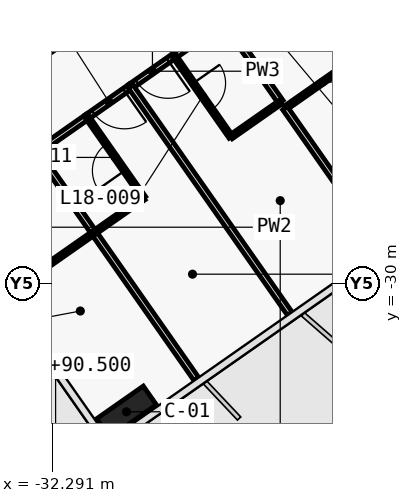
"""IFC4 building model, lengths in metres.
Left out: names, types, materials, properties, quantities, classifications, styles, units other than length and angle.
Written with IfcOpenShell. Run it as: python <this file> out.ifc"""

import sys

from ifc_helpers import new_model, si_unit, direction, frame, frame_2d, origin, origin_2d, place, context, subcontext, project, spatial, rectangle, extrude, element, fill, save


model = new_model("IFC4")
c1 = context("Model", 3, precision=1e-05, world=origin(), true_north=direction((0.0, 1.0)))
c2 = subcontext(c1, "Body", "Model", "MODEL_VIEW")
j1 = project(units=[si_unit("LENGTHUNIT", "METRE"), si_unit("PLANEANGLEUNIT", "RADIAN")], contexts=[c1])
p1 = place(None, origin())
s1 = spatial("IfcSite", under=j1, at=p1, CompositionType="ELEMENT")
p2 = place(p1, origin())
s2 = spatial("IfcBuilding", under=s1, at=p2, CompositionType="ELEMENT")
p3 = place(p2, frame((0.0, 0.0, 90.5)))
s3 = spatial("IfcBuildingStorey", under=s2, at=p3, CompositionType="ELEMENT", Elevation=90.5)
p4 = place(p3, frame((-30.336, -33.388, 0.0), z_axis=(0.0, 0.0, 1.0), x_axis=(-0.819152044289, -0.573576436351, 0.0)))
e1 = element("IfcColumn", 1, at=p4, inside=s3, PredefinedType="COLUMN", context=c2, shape_type="SweptSolid", body=[
    extrude(rectangle(XDim=1.5, YDim=0.6, at=origin_2d()), origin(), (0.0, 0.0, 1.0), 3.6),
])
p5 = place(p3, frame((-33.341, -24.566, 0.0), z_axis=(0.0, 0.0, 1.0), x_axis=(0.819179439794, 0.573537309527, 0.0)))
e2 = element("IfcWall", 2, at=p5, inside=s3, PredefinedType="PARTITIONING", context=c2, shape_type="SweptSolid", body=[
    extrude(rectangle(XDim=2.404, YDim=0.15, at=frame_2d((1.202, 0.0))), origin(), (0.0, 0.0, 1.0), 3.32),
])
p6 = place(p3, frame((-29.079, -24.023, 0.0), z_axis=(0.0, 0.0, 1.0), x_axis=(-0.81914197737, -0.573590813132, 0.0)))
e3 = element("IfcWall", 3, at=p6, inside=s3, PredefinedType="PARTITIONING", context=c2, shape_type="SweptSolid", body=[
    extrude(rectangle(XDim=1.403, YDim=0.15, at=frame_2d((0.701, 0.0))), origin(), (0.0, 0.0, 1.0), 3.32),
])
p7 = place(p6, frame((0.201, 0.0, 0.0)))
e4 = element("IfcOpeningElement", 4, at=p7, cuts=e3, PredefinedType="OPENING", context=c2, shape_type="SweptSolid", body=[
    extrude(rectangle(XDim=1.0, YDim=2.1, at=frame_2d((0.5, 1.05))), frame((0.0, 0.085, 0.0), z_axis=(0.0, -1.0, 0.0), x_axis=(1.0, 0.0, 0.0)), (0.0, 0.0, 1.0), 0.17),
])
p8 = place(p3, frame((-27.767, -23.105, 0.0), z_axis=(0.0, 0.0, 1.0), x_axis=(-0.819117502046, -0.573625764625, 0.0)))
e5 = element("IfcWall", 5, at=p8, inside=s3, PredefinedType="PARTITIONING", context=c2, shape_type="SweptSolid", body=[
    extrude(rectangle(XDim=1.604, YDim=0.15, at=frame_2d((0.802, 0.0))), origin(), (0.0, 0.0, 1.0), 2.6),
])
p9 = place(p3, frame((-30.225, -24.826, 0.0), z_axis=(0.0, 0.0, 1.0), x_axis=(-0.819060210533, -0.573707566205, 0.0)))
e6 = element("IfcWall", 6, at=p9, inside=s3, PredefinedType="PARTITIONING", context=c2, shape_type="SweptSolid", body=[
    extrude(rectangle(XDim=1.403, YDim=0.15, at=frame_2d((0.702, 0.0))), origin(), (0.0, 0.0, 1.0), 3.32),
])
p10 = place(p9, frame((0.202, 0.0, 0.0)))
e7 = element("IfcOpeningElement", 7, at=p10, cuts=e6, PredefinedType="OPENING", context=c2, shape_type="SweptSolid", body=[
    extrude(rectangle(XDim=1.0, YDim=2.1, at=frame_2d((0.5, 1.05))), frame((0.0, 0.085, 0.0), z_axis=(0.0, -1.0, 0.0), x_axis=(1.0, 0.0, 0.0)), (0.0, 0.0, 1.0), 0.17),
])
p11 = place(p3, frame((-31.371, -25.629, 0.0), z_axis=(0.0, 0.0, 1.0), x_axis=(-0.819189013667, -0.573523634986, 0.0)))
e8 = element("IfcWall", 8, at=p11, inside=s3, PredefinedType="PARTITIONING", context=c2, shape_type="SweptSolid", body=[
    extrude(rectangle(XDim=1.604, YDim=0.15, at=frame_2d((0.802, 0.0))), origin(), (0.0, 0.0, 1.0), 3.32),
])
p12 = place(p3, frame((-26.162, -25.401, 0.0), z_axis=(0.0, 0.0, 1.0), x_axis=(0.819155442668, 0.573571582932, 0.0)))
e9 = element("IfcWall", 9, at=p12, inside=s3, PredefinedType="PARTITIONING", context=c2, shape_type="SweptSolid", body=[
    extrude(rectangle(XDim=2.4, YDim=0.12, at=frame_2d((1.2, 0.0))), origin(), (0.0, 0.0, 1.0), 2.6),
])
p13 = place(p3, frame((-24.196, -24.023, 0.0), z_axis=(0.0, 0.0, 1.0), x_axis=(-0.573608623498, 0.819129505664, 0.0)))
e10 = element("IfcWall", 10, at=p13, inside=s3, PredefinedType="PARTITIONING", context=c2, shape_type="SweptSolid", body=[
    extrude(rectangle(XDim=2.8, YDim=0.12, at=frame_2d((1.4, 0.0))), origin(), (0.0, 0.0, 1.0), 3.32),
])
p14 = place(p13, frame((0.975, 0.0, 0.0)))
e11 = element("IfcOpeningElement", 11, at=p14, cuts=e10, PredefinedType="OPENING", context=c2, shape_type="SweptSolid", body=[
    extrude(rectangle(XDim=0.85, YDim=2.05, at=frame_2d((0.425, 1.025))), frame((0.0, 0.07, 0.0), z_axis=(0.0, -1.0, 0.0), x_axis=(1.0, 0.0, 0.0)), (0.0, 0.0, 1.0), 0.14),
])
p15 = place(p3, frame((-23.966, -28.537, 0.0), z_axis=(0.0, 0.0, 1.0), x_axis=(-0.573594994199, 0.819139049631, 0.0)))
e12 = element("IfcWall", 12, at=p15, inside=s3, PredefinedType="PARTITIONING", context=c2, shape_type="SweptSolid", body=[
    extrude(rectangle(XDim=3.829, YDim=0.15, at=frame_2d((1.915, 0.0))), origin(), (0.0, 0.0, 1.0), 2.6),
])
p16 = place(p3, frame((-26.276, -25.238, 0.0), z_axis=(0.0, 0.0, 1.0), x_axis=(-0.573588285102, 0.819143747577, 0.0)))
e13 = element("IfcWall", 13, at=p16, inside=s3, PredefinedType="PARTITIONING", context=c2, shape_type="SweptSolid", body=[
    extrude(rectangle(XDim=2.602, YDim=0.15, at=frame_2d((1.301, 0.0))), origin(), (0.0, 0.0, 1.0), 2.6),
])
p17 = place(p3, frame((-29.08, -24.024, 0.0), z_axis=(0.0, 0.0, 1.0), x_axis=(0.573537965655, -0.819178980414, 0.0)))
e14 = element("IfcWall", 14, at=p17, inside=s3, PredefinedType="PARTITIONING", context=c2, shape_type="SweptSolid", body=[
    extrude(rectangle(XDim=2.6, YDim=0.12, at=frame_2d((1.3, 0.0))), origin(), (0.0, 0.0, 1.0), 3.32),
])
p18 = place(p17, frame((0.875, 0.0, 0.0)))
e15 = element("IfcOpeningElement", 15, at=p18, cuts=e14, PredefinedType="OPENING", context=c2, shape_type="SweptSolid", body=[
    extrude(rectangle(XDim=0.85, YDim=2.05, at=frame_2d((0.425, 1.025))), frame((0.0, 0.07, 0.0), z_axis=(0.0, -1.0, 0.0), x_axis=(1.0, 0.0, 0.0)), (0.0, 0.0, 1.0), 0.14),
])
p19 = place(p3, frame((-27.587, -26.155, 0.0), z_axis=(0.0, 0.0, 1.0), x_axis=(0.819131543282, 0.57360571371, 0.0)))
e16 = element("IfcWall", 16, at=p19, inside=s3, PredefinedType="PARTITIONING", context=c2, shape_type="SweptSolid", body=[
    extrude(rectangle(XDim=1.6, YDim=0.12, at=frame_2d((0.8, 0.0))), origin(), (0.0, 0.0, 1.0), 2.6),
])
p20 = place(p3, frame((-26.039, -30.807, 0.0), z_axis=(0.0, 0.0, 1.0), x_axis=(-0.573594765376, 0.819139209862, 0.0)))
e17 = element("IfcWall", 17, at=p20, inside=s3, PredefinedType="PARTITIONING", context=c2, shape_type="SweptSolid", body=[
    extrude(rectangle(XDim=7.3, YDim=0.15, at=frame_2d((3.65, 0.0))), origin(), (0.0, 0.0, 1.0), 2.5),
])
p21 = place(p3, frame((-31.192, -28.678, 0.0), z_axis=(0.0, 0.0, 1.0), x_axis=(0.81918174131, 0.573534022273, 0.0)))
e18 = element("IfcWall", 18, at=p21, inside=s3, PredefinedType="PARTITIONING", context=c2, shape_type="SweptSolid", body=[
    extrude(rectangle(XDim=1.6, YDim=0.12, at=frame_2d((0.8, 0.0))), origin(), (0.0, 0.0, 1.0), 3.32),
])
p22 = place(p3, frame((-29.881, -27.759, 0.0), z_axis=(0.0, 0.0, 1.0), x_axis=(-0.573600972199, 0.819134863556, 0.0)))
e19 = element("IfcWall", 19, at=p22, inside=s3, PredefinedType="PARTITIONING", context=c2, shape_type="SweptSolid", body=[
    extrude(rectangle(XDim=2.6, YDim=0.12, at=frame_2d((1.3, 0.0))), origin(), (0.0, 0.0, 1.0), 3.32),
])
p23 = place(p22, frame((0.875, 0.0, 0.0)))
e20 = element("IfcOpeningElement", 20, at=p23, cuts=e19, PredefinedType="OPENING", context=c2, shape_type="SweptSolid", body=[
    extrude(rectangle(XDim=0.85, YDim=2.05, at=frame_2d((0.425, 1.025))), frame((0.0, 0.07, 0.0), z_axis=(0.0, -1.0, 0.0), x_axis=(1.0, 0.0, 0.0)), (0.0, 0.0, 1.0), 0.14),
])
p24 = place(p3, frame((-28.497, -32.528, 0.0), z_axis=(0.0, 0.0, 1.0), x_axis=(-0.573570431261, 0.819156249066, 0.0)))
e21 = element("IfcWall", 21, at=p24, inside=s3, PredefinedType="PARTITIONING", context=c2, shape_type="SweptSolid", body=[
    extrude(rectangle(XDim=4.699, YDim=0.15, at=frame_2d((2.35, 0.0))), origin(), (0.0, 0.0, 1.0), 2.5),
])
p25 = place(p3, frame((-31.192, -28.677, 0.0), z_axis=(0.0, 0.0, 1.0), x_axis=(-0.573537965655, 0.819178980414, 0.0)))
e22 = element("IfcWall", 22, at=p25, inside=s3, PredefinedType="PARTITIONING", context=c2, shape_type="SweptSolid", body=[
    extrude(rectangle(XDim=2.6, YDim=0.15, at=frame_2d((1.3, 0.0))), origin(), (0.0, 0.0, 1.0), 3.32),
])
p26 = place(p3, frame((-32.502, -29.596, 0.0), z_axis=(0.0, 0.0, 1.0), x_axis=(0.819131543282, 0.57360571371, 0.0)))
e23 = element("IfcWall", 23, at=p26, inside=s3, PredefinedType="PARTITIONING", context=c2, shape_type="SweptSolid", body=[
    extrude(rectangle(XDim=1.6, YDim=0.12, at=frame_2d((0.8, 0.0))), origin(), (0.0, 0.0, 1.0), 3.32),
])
p27 = place(p18, origin())
e24 = element("IfcDoor", 24, at=p27, inside=s3, OperationType="SINGLE_SWING_RIGHT", PredefinedType="DOOR", context=c2, shape_type="SweptSolid", body=[
    extrude(rectangle(XDim=0.85, YDim=2.05, at=frame_2d((0.425, 1.025))), frame((0.0, 0.025, 0.0), z_axis=(0.0, -1.0, 0.0), x_axis=(1.0, 0.0, 0.0)), (0.0, 0.0, 1.0), 0.05),
])
fill(e15, e24)
p28 = place(p7, origin())
e25 = element("IfcDoor", 25, at=p28, inside=s3, OperationType="SINGLE_SWING_LEFT", PredefinedType="DOOR", context=c2, shape_type="SweptSolid", body=[
    extrude(rectangle(XDim=1.0, YDim=2.1, at=frame_2d((0.5, 1.05))), frame((0.0, 0.025, 0.0), z_axis=(0.0, -1.0, 0.0), x_axis=(1.0, 0.0, 0.0)), (0.0, 0.0, 1.0), 0.05),
])
fill(e4, e25)
p29 = place(p23, origin())
e26 = element("IfcDoor", 26, at=p29, inside=s3, OperationType="SINGLE_SWING_RIGHT", PredefinedType="DOOR", context=c2, shape_type="SweptSolid", body=[
    extrude(rectangle(XDim=0.85, YDim=2.05, at=frame_2d((0.425, 1.025))), frame((0.0, 0.025, 0.0), z_axis=(0.0, -1.0, 0.0), x_axis=(1.0, 0.0, 0.0)), (0.0, 0.0, 1.0), 0.05),
])
fill(e20, e26)
p30 = place(p10, origin())
e27 = element("IfcDoor", 27, at=p30, inside=s3, OperationType="SINGLE_SWING_LEFT", PredefinedType="DOOR", context=c2, shape_type="SweptSolid", body=[
    extrude(rectangle(XDim=1.0, YDim=2.1, at=frame_2d((0.5, 1.05))), frame((0.0, 0.025, 0.0), z_axis=(0.0, -1.0, 0.0), x_axis=(1.0, 0.0, 0.0)), (0.0, 0.0, 1.0), 0.05),
])
fill(e7, e27)
save(model, sys.argv[1])
